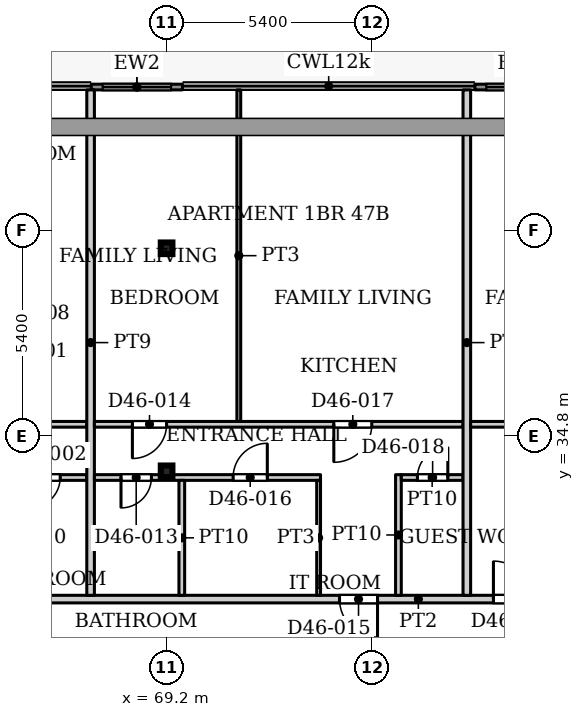
"""IFC4 building model, lengths in metres.
Left out: names, types, materials, properties, quantities, classifications, styles, units other than length and angle.
Written with IfcOpenShell. Run it as: python <this file> out.ifc"""

import sys

from ifc_helpers import new_model, si_unit, direction, frame, frame_2d, origin, origin_2d, place, context, subcontext, project, spatial, rectangle, hollow_rectangle, extrude, source, transform, mapped, element, fill, save


model = new_model("IFC4")
c1 = context("Model", 3, precision=1e-05, world=origin(), true_north=direction((0.0, 1.0)))
c2 = subcontext(c1, "Body", "Model", "MODEL_VIEW")
j1 = project(units=[si_unit("LENGTHUNIT", "METRE"), si_unit("PLANEANGLEUNIT", "RADIAN")], contexts=[c1])
p1 = place(None, origin())
s1 = spatial("IfcSite", under=j1, at=p1, CompositionType="ELEMENT")
p2 = place(p1, origin())
s2 = spatial("IfcBuilding", under=s1, at=p2, CompositionType="ELEMENT")
p3 = place(p2, frame((0.0, 0.0, 199.4)))
s3 = spatial("IfcBuildingStorey", under=s2, at=p3, CompositionType="ELEMENT", Elevation=199.4)
for number, where, z_axis, x_axis in (
    (1, (69.2, 33.863, 0.0), (0.0, 0.0, 1.0), (1.0, 0.0, 0.0)),
    (2, (69.2, 39.732, 0.0), (0.0, 0.0, 1.0), (1.0, 0.0, 0.0)),
):
    element("IfcColumn", number, at=place(p3, frame(where, z_axis=z_axis, x_axis=x_axis)), inside=s3, PredefinedType="COLUMN", context=c2, shape_type="SweptSolid", body=[
        extrude(hollow_rectangle(XDim=0.305, YDim=0.305, WallThickness=0.016, InnerFilletRadius=0.016, OuterFilletRadius=0.032, at=origin_2d()), origin(), (0.0, 0.0, 1.0), 3.9),
    ])
p4 = place(p3, frame((67.218, 43.975, 0.0), z_axis=(0.0, 0.0, 1.0), x_axis=(1.0, 0.0, 0.0)))
e3 = element("IfcWall", 3, at=p4, inside=s3, PredefinedType="SOLIDWALL", context=c2, shape_type="SweptSolid", body=[
    extrude(rectangle(XDim=2.4, YDim=0.15, at=frame_2d((1.2, 0.0))), origin(), (0.0, 0.0, 1.0), 3.75),
])
p5 = place(p4, frame((0.3, 0.0, 0.0)))
e4 = element("IfcOpeningElement", 4, at=p5, cuts=e3, PredefinedType="OPENING", context=c2, shape_type="SweptSolid", body=[
    extrude(rectangle(XDim=1.8, YDim=2.4, at=frame_2d((0.9, 1.2))), frame((0.0, 0.085, 0.0), z_axis=(0.0, -1.0, 0.0), x_axis=(1.0, 0.0, 0.0)), (0.0, 0.0, 1.0), 0.17),
])
p6 = place(p3, frame((77.312, 43.975, 0.0), z_axis=(0.0, 0.0, 1.0), x_axis=(1.0, 0.0, 0.0)))
e5 = element("IfcWall", 5, at=p6, inside=s3, PredefinedType="SOLIDWALL", context=c2, shape_type="SweptSolid", body=[
    extrude(rectangle(XDim=2.4, YDim=0.15, at=frame_2d((1.2, 0.0))), origin(), (0.0, 0.0, 1.0), 3.75),
])
p7 = place(p6, frame((0.3, 0.0, 0.0)))
e6 = element("IfcOpeningElement", 6, at=p7, cuts=e5, PredefinedType="OPENING", context=c2, shape_type="SweptSolid", body=[
    extrude(rectangle(XDim=1.8, YDim=2.4, at=frame_2d((0.9, 1.2))), frame((0.0, 0.085, 0.0), z_axis=(0.0, -1.0, 0.0), x_axis=(1.0, 0.0, 0.0)), (0.0, 0.0, 1.0), 0.17),
])
p8 = place(p3, frame((53.549, 30.5, 0.0), z_axis=(0.0, 0.0, 1.0), x_axis=(1.0, 0.0, 0.0)))
e7 = element("IfcWall", 7, at=p8, inside=s3, PredefinedType="PARTITIONING", context=c2, shape_type="SweptSolid", body=[
    extrude(rectangle(XDim=44.551, YDim=0.2, at=frame_2d((22.275, 0.0))), origin(), (0.0, 0.0, 1.0), 3.6),
])
p9 = place(p8, frame((5.501, 0.0, 0.0)))
e8 = element("IfcOpeningElement", 8, at=p9, cuts=e7, PredefinedType="OPENING", context=c2, shape_type="SweptSolid", body=[
    extrude(rectangle(XDim=1.0, YDim=2.1, at=frame_2d((0.5, 1.05))), frame((0.0, 0.11, 0.0), z_axis=(0.0, -1.0, 0.0), x_axis=(1.0, 0.0, 0.0)), (0.0, 0.0, 1.0), 0.22),
])
p10 = place(p8, frame((20.201, 0.0, 0.0)))
e9 = element("IfcOpeningElement", 9, at=p10, cuts=e7, PredefinedType="OPENING", context=c2, shape_type="SweptSolid", body=[
    extrude(rectangle(XDim=1.0, YDim=2.1, at=frame_2d((0.5, 1.05))), frame((0.0, 0.11, 0.0), z_axis=(0.0, -1.0, 0.0), x_axis=(1.0, 0.0, 0.0)), (0.0, 0.0, 1.0), 0.22),
])
p11 = place(p8, frame((24.251, 0.0, 0.0)))
e10 = element("IfcOpeningElement", 10, at=p11, cuts=e7, PredefinedType="OPENING", context=c2, shape_type="SweptSolid", body=[
    extrude(rectangle(XDim=1.0, YDim=2.1, at=frame_2d((0.5, 1.05))), frame((0.0, 0.11, 0.0), z_axis=(0.0, -1.0, 0.0), x_axis=(1.0, 0.0, 0.0)), (0.0, 0.0, 1.0), 0.22),
])
p12 = place(p8, frame((40.151, 0.0, 0.0)))
e11 = element("IfcOpeningElement", 11, at=p12, cuts=e7, PredefinedType="OPENING", context=c2, shape_type="SweptSolid", body=[
    extrude(rectangle(XDim=1.0, YDim=2.1, at=frame_2d((0.5, 1.05))), frame((0.0, 0.11, 0.0), z_axis=(0.0, -1.0, 0.0), x_axis=(1.0, 0.0, 0.0)), (0.0, 0.0, 1.0), 0.22),
])
p13 = place(p3, frame((53.549, 35.1, 0.0), z_axis=(0.0, 0.0, 1.0), x_axis=(1.0, 0.0, 0.0)))
e12 = element("IfcWall", 12, at=p13, inside=s3, PredefinedType="PARTITIONING", context=c2, shape_type="SweptSolid", body=[
    extrude(rectangle(XDim=13.551, YDim=0.15, at=frame_2d((6.775, 0.0))), origin(), (0.0, 0.0, 1.0), 3.6),
])
p14 = place(p13, frame((3.901, 0.0, 0.0)))
e13 = element("IfcOpeningElement", 13, at=p14, cuts=e12, PredefinedType="OPENING", context=c2, shape_type="SweptSolid", body=[
    extrude(rectangle(XDim=0.9, YDim=2.1, at=frame_2d((0.45, 1.05))), frame((0.0, 0.085, 0.0), z_axis=(0.0, -1.0, 0.0), x_axis=(1.0, 0.0, 0.0)), (0.0, 0.0, 1.0), 0.17),
])
p15 = place(p13, frame((8.701, 0.0, 0.0)))
e14 = element("IfcOpeningElement", 14, at=p15, cuts=e12, PredefinedType="OPENING", context=c2, shape_type="SweptSolid", body=[
    extrude(rectangle(XDim=0.9, YDim=2.1, at=frame_2d((0.45, 1.05))), frame((0.0, 0.085, 0.0), z_axis=(0.0, -1.0, 0.0), x_axis=(1.0, 0.0, 0.0)), (0.0, 0.0, 1.0), 0.17),
])
p16 = place(p13, frame((11.501, 0.0, 0.0)))
e15 = element("IfcOpeningElement", 15, at=p16, cuts=e12, PredefinedType="OPENING", context=c2, shape_type="SweptSolid", body=[
    extrude(rectangle(XDim=1.0, YDim=2.1, at=frame_2d((0.5, 1.05))), frame((0.0, 0.085, 0.0), z_axis=(0.0, -1.0, 0.0), x_axis=(1.0, 0.0, 0.0)), (0.0, 0.0, 1.0), 0.17),
])
p17 = place(p13, frame((6.301, 0.0, 0.0)))
e16 = element("IfcOpeningElement", 16, at=p17, cuts=e12, PredefinedType="OPENING", context=c2, shape_type="SweptSolid", body=[
    extrude(rectangle(XDim=0.9, YDim=2.1, at=frame_2d((0.45, 1.05))), frame((0.0, 0.085, 0.0), z_axis=(0.0, -1.0, 0.0), x_axis=(1.0, 0.0, 0.0)), (0.0, 0.0, 1.0), 0.17),
])
p18 = place(p13, frame((0.15, 0.0, 0.0)))
e17 = element("IfcOpeningElement", 17, at=p18, cuts=e12, PredefinedType="OPENING", context=c2, shape_type="SweptSolid", body=[
    extrude(rectangle(XDim=0.7, YDim=2.1, at=frame_2d((0.35, 1.05))), frame((0.0, 0.085, 0.0), z_axis=(0.0, -1.0, 0.0), x_axis=(1.0, 0.0, 0.0)), (0.0, 0.0, 1.0), 0.17),
])
p19 = place(p3, frame((60.525, 33.7, 0.0), z_axis=(0.0, 0.0, 1.0), x_axis=(1.0, 0.0, 0.0)))
e18 = element("IfcWall", 18, at=p19, inside=s3, PredefinedType="PARTITIONING", context=c2, shape_type="SweptSolid", body=[
    extrude(rectangle(XDim=6.575, YDim=0.15, at=frame_2d((3.288, 0.0))), origin(), (0.0, 0.0, 1.0), 3.6),
])
p20 = place(p19, frame((2.675, 0.0, 0.0)))
e19 = element("IfcOpeningElement", 19, at=p20, cuts=e18, PredefinedType="OPENING", context=c2, shape_type="SweptSolid", body=[
    extrude(rectangle(XDim=0.8, YDim=2.1, at=frame_2d((0.4, 1.05))), frame((0.0, 0.085, 0.0), z_axis=(0.0, -1.0, 0.0), x_axis=(1.0, 0.0, 0.0)), (0.0, 0.0, 1.0), 0.17),
])
p21 = place(p19, frame((5.075, 0.0, 0.0)))
e20 = element("IfcOpeningElement", 20, at=p21, cuts=e18, PredefinedType="OPENING", context=c2, shape_type="SweptSolid", body=[
    extrude(rectangle(XDim=0.8, YDim=2.1, at=frame_2d((0.4, 1.05))), frame((0.0, 0.085, 0.0), z_axis=(0.0, -1.0, 0.0), x_axis=(1.0, 0.0, 0.0)), (0.0, 0.0, 1.0), 0.17),
])
p22 = place(p19, frame((0.575, 0.0, 0.0)))
e21 = element("IfcOpeningElement", 21, at=p22, cuts=e18, PredefinedType="OPENING", context=c2, shape_type="SweptSolid", body=[
    extrude(rectangle(XDim=0.8, YDim=2.1, at=frame_2d((0.4, 1.05))), frame((0.0, 0.085, 0.0), z_axis=(0.0, -1.0, 0.0), x_axis=(1.0, 0.0, 0.0)), (0.0, 0.0, 1.0), 0.17),
])
p23 = place(p3, frame((67.2, 30.6, 0.0), z_axis=(0.0, 0.0, 1.0), x_axis=(0.0, 1.0, 0.0)))
e22 = element("IfcWall", 22, at=p23, inside=s3, PredefinedType="PARTITIONING", context=c2, shape_type="SweptSolid", body=[
    extrude(rectangle(XDim=13.3, YDim=0.2, at=frame_2d((6.65, 0.0))), origin(), (0.0, 0.0, 1.0), 3.6),
])
p24 = place(p3, frame((67.3, 33.7, 0.0), z_axis=(0.0, 0.0, 1.0), x_axis=(1.0, 0.0, 0.0)))
e23 = element("IfcWall", 23, at=p24, inside=s3, PredefinedType="PARTITIONING", context=c2, shape_type="SweptSolid", body=[
    extrude(rectangle(XDim=5.95, YDim=0.15, at=frame_2d((2.975, 0.0))), origin(), (0.0, 0.0, 1.0), 3.6),
])
p25 = place(p24, frame((0.7, 0.0, 0.0)))
e24 = element("IfcOpeningElement", 24, at=p25, cuts=e23, PredefinedType="OPENING", context=c2, shape_type="SweptSolid", body=[
    extrude(rectangle(XDim=0.8, YDim=2.1, at=frame_2d((0.4, 1.05))), frame((0.0, 0.085, 0.0), z_axis=(0.0, -1.0, 0.0), x_axis=(1.0, 0.0, 0.0)), (0.0, 0.0, 1.0), 0.17),
])
p26 = place(p24, frame((3.65, 0.0, 0.0)))
e25 = element("IfcOpeningElement", 25, at=p26, cuts=e23, PredefinedType="OPENING", context=c2, shape_type="SweptSolid", body=[
    extrude(rectangle(XDim=0.9, YDim=2.1, at=frame_2d((0.45, 1.05))), frame((0.0, 0.085, 0.0), z_axis=(0.0, -1.0, 0.0), x_axis=(1.0, 0.0, 0.0)), (0.0, 0.0, 1.0), 0.17),
])
p27 = place(p3, frame((67.3, 35.1, 0.0), z_axis=(0.0, 0.0, 1.0), x_axis=(1.0, 0.0, 0.0)))
e26 = element("IfcWall", 26, at=p27, inside=s3, PredefinedType="PARTITIONING", context=c2, shape_type="SweptSolid", body=[
    extrude(rectangle(XDim=9.7, YDim=0.15, at=frame_2d((4.85, 0.0))), origin(), (0.0, 0.0, 1.0), 3.6),
])
p28 = place(p27, frame((1.0, 0.0, 0.0)))
e27 = element("IfcOpeningElement", 27, at=p28, cuts=e26, PredefinedType="OPENING", context=c2, shape_type="SweptSolid", body=[
    extrude(rectangle(XDim=0.9, YDim=2.1, at=frame_2d((0.45, 1.05))), frame((0.0, 0.085, 0.0), z_axis=(0.0, -1.0, 0.0), x_axis=(1.0, 0.0, 0.0)), (0.0, 0.0, 1.0), 0.17),
])
p29 = place(p27, frame((6.3, 0.0, 0.0)))
e28 = element("IfcOpeningElement", 28, at=p29, cuts=e26, PredefinedType="OPENING", context=c2, shape_type="SweptSolid", body=[
    extrude(rectangle(XDim=1.0, YDim=2.1, at=frame_2d((0.5, 1.05))), frame((0.0, 0.085, 0.0), z_axis=(0.0, -1.0, 0.0), x_axis=(1.0, 0.0, 0.0)), (0.0, 0.0, 1.0), 0.17),
])
p30 = place(p3, frame((69.6, 30.6, 0.0), z_axis=(0.0, 0.0, 1.0), x_axis=(0.0, 1.0, 0.0)))
e29 = element("IfcWall", 29, at=p30, inside=s3, PredefinedType="PARTITIONING", context=c2, shape_type="SweptSolid", body=[
    extrude(rectangle(XDim=3.025, YDim=0.15, at=frame_2d((1.512, 0.0))), origin(), (0.0, 0.0, 1.0), 3.6),
])
p31 = place(p3, frame((71.1, 35.175, 0.0), z_axis=(0.0, 0.0, 1.0), x_axis=(0.0, 1.0, 0.0)))
e30 = element("IfcWall", 30, at=p31, inside=s3, PredefinedType="PARTITIONING", context=c2, shape_type="SweptSolid", body=[
    extrude(rectangle(XDim=8.725, YDim=0.1, at=frame_2d((4.362, 0.0))), origin(), (0.0, 0.0, 1.0), 3.6),
])
p32 = place(p3, frame((73.2, 30.6, 0.0), z_axis=(0.0, 0.0, 1.0), x_axis=(0.0, 1.0, 0.0)))
e31 = element("IfcWall", 31, at=p32, inside=s3, PredefinedType="PARTITIONING", context=c2, shape_type="SweptSolid", body=[
    extrude(rectangle(XDim=3.025, YDim=0.1, at=frame_2d((1.512, 0.0))), origin(), (0.0, 0.0, 1.0), 3.6),
])
p33 = place(p3, frame((75.3, 30.6, 0.0), z_axis=(0.0, 0.0, 1.0), x_axis=(0.0, 1.0, 0.0)))
e32 = element("IfcWall", 32, at=p33, inside=s3, PredefinedType="PARTITIONING", context=c2, shape_type="SweptSolid", body=[
    extrude(rectangle(XDim=3.175, YDim=0.15, at=frame_2d((1.587, 0.0))), origin(), (0.0, 0.0, 1.0), 3.6),
])
p34 = place(p3, frame((75.375, 33.7, 0.0), z_axis=(0.0, 0.0, 1.0), x_axis=(1.0, 0.0, 0.0)))
e33 = element("IfcWall", 33, at=p34, inside=s3, PredefinedType="PARTITIONING", context=c2, shape_type="SweptSolid", body=[
    extrude(rectangle(XDim=1.625, YDim=0.15, at=frame_2d((0.812, 0.0))), origin(), (0.0, 0.0, 1.0), 3.6),
])
p35 = place(p34, frame((0.425, 0.0, 0.0)))
e34 = element("IfcOpeningElement", 34, at=p35, cuts=e33, PredefinedType="OPENING", context=c2, shape_type="SweptSolid", body=[
    extrude(rectangle(XDim=0.8, YDim=2.1, at=frame_2d((0.4, 1.05))), frame((0.0, 0.085, 0.0), z_axis=(0.0, -1.0, 0.0), x_axis=(1.0, 0.0, 0.0)), (0.0, 0.0, 1.0), 0.17),
])
p36 = place(p3, frame((77.1, 30.6, 0.0), z_axis=(0.0, 0.0, 1.0), x_axis=(0.0, 1.0, 0.0)))
e35 = element("IfcWall", 35, at=p36, inside=s3, PredefinedType="PARTITIONING", context=c2, shape_type="SweptSolid", body=[
    extrude(rectangle(XDim=13.3, YDim=0.2, at=frame_2d((6.65, 0.0))), origin(), (0.0, 0.0, 1.0), 3.6),
])
p37 = place(p3, frame((77.2, 35.1, 0.0), z_axis=(0.0, 0.0, 1.0), x_axis=(1.0, 0.0, 0.0)))
e36 = element("IfcWall", 36, at=p37, inside=s3, PredefinedType="PARTITIONING", context=c2, shape_type="SweptSolid", body=[
    extrude(rectangle(XDim=11.8, YDim=0.15, at=frame_2d((5.9, 0.0))), origin(), (0.0, 0.0, 1.0), 3.6),
])
p38 = place(p37, frame((6.2, 0.0, 0.0)))
e37 = element("IfcOpeningElement", 37, at=p38, cuts=e36, PredefinedType="OPENING", context=c2, shape_type="SweptSolid", body=[
    extrude(rectangle(XDim=0.9, YDim=2.1, at=frame_2d((0.45, 1.05))), frame((0.0, 0.085, 0.0), z_axis=(0.0, -1.0, 0.0), x_axis=(1.0, 0.0, 0.0)), (0.0, 0.0, 1.0), 0.17),
])
p39 = place(p37, frame((1.95, 0.0, 0.0)))
e38 = element("IfcOpeningElement", 38, at=p39, cuts=e36, PredefinedType="OPENING", context=c2, shape_type="SweptSolid", body=[
    extrude(rectangle(XDim=1.0, YDim=2.1, at=frame_2d((0.5, 1.05))), frame((0.0, 0.085, 0.0), z_axis=(0.0, -1.0, 0.0), x_axis=(1.0, 0.0, 0.0)), (0.0, 0.0, 1.0), 0.17),
])
p40 = place(p37, frame((10.7, 0.0, 0.0)))
e39 = element("IfcOpeningElement", 39, at=p40, cuts=e36, PredefinedType="OPENING", context=c2, shape_type="SweptSolid", body=[
    extrude(rectangle(XDim=0.9, YDim=2.1, at=frame_2d((0.45, 1.05))), frame((0.0, 0.085, 0.0), z_axis=(0.0, -1.0, 0.0), x_axis=(1.0, 0.0, 0.0)), (0.0, 0.0, 1.0), 0.17),
])
m1 = source(origin(), c2, "Body", "SweptSolid", [
    extrude(rectangle(XDim=1.8, YDim=2.4, at=frame_2d((0.9, 1.2))), frame((0.0, 0.025, 0.0), z_axis=(0.0, -1.0, 0.0), x_axis=(1.0, 0.0, 0.0)), (0.0, 0.0, 1.0), 0.05),
])
p41 = place(p5, origin())
e40 = element("IfcDoor", 40, at=p41, inside=s3, OperationType="SLIDING_TO_LEFT", PredefinedType="DOOR", context=c2, shape_type="MappedRepresentation", body=[
    mapped(m1, transform((0.0, 0.0, 0.0), x_axis=(1.0, 0.0, 0.0), y_axis=(0.0, 1.0, 0.0), z_axis=(0.0, 0.0, 1.0), scale=1.0)),
])
fill(e4, e40)
p42 = place(p7, origin())
e41 = element("IfcDoor", 41, at=p42, inside=s3, OperationType="SLIDING_TO_LEFT", PredefinedType="DOOR", context=c2, shape_type="MappedRepresentation", body=[
    mapped(m1, transform((0.0, 0.0, 0.0), x_axis=(1.0, 0.0, 0.0), y_axis=(0.0, 1.0, 0.0), z_axis=(0.0, 0.0, 1.0), scale=1.0)),
])
fill(e6, e41)
m2 = source(origin(), c2, "Body", "SweptSolid", [
    extrude(rectangle(XDim=0.8, YDim=2.1, at=frame_2d((0.4, 1.05))), frame((0.0, 0.025, 0.0), z_axis=(0.0, -1.0, 0.0), x_axis=(1.0, 0.0, 0.0)), (0.0, 0.0, 1.0), 0.05),
])
p43 = place(p21, origin())
e42 = element("IfcDoor", 42, at=p43, inside=s3, OperationType="SINGLE_SWING_RIGHT", PredefinedType="DOOR", context=c2, shape_type="MappedRepresentation", body=[
    mapped(m2, transform((0.0, 0.0, 0.0), x_axis=(1.0, 0.0, 0.0), y_axis=(0.0, 1.0, 0.0), z_axis=(0.0, 0.0, 1.0), scale=1.0)),
])
fill(e20, e42)
p44 = place(p25, origin())
e43 = element("IfcDoor", 43, at=p44, inside=s3, OperationType="SINGLE_SWING_RIGHT", PredefinedType="DOOR", context=c2, shape_type="MappedRepresentation", body=[
    mapped(m2, transform((0.0, 0.0, 0.0), x_axis=(1.0, 0.0, 0.0), y_axis=(0.0, 1.0, 0.0), z_axis=(0.0, 0.0, 1.0), scale=1.0)),
])
fill(e24, e43)
m3 = source(origin(), c2, "Body", "SweptSolid", [
    extrude(rectangle(XDim=0.9, YDim=2.1, at=frame_2d((0.45, 1.05))), frame((0.0, 0.025, 0.0), z_axis=(0.0, -1.0, 0.0), x_axis=(1.0, 0.0, 0.0)), (0.0, 0.0, 1.0), 0.05),
])
p45 = place(p28, origin())
e44 = element("IfcDoor", 44, at=p45, inside=s3, OperationType="SINGLE_SWING_RIGHT", PredefinedType="DOOR", context=c2, shape_type="MappedRepresentation", body=[
    mapped(m3, transform((0.0, 0.0, 0.0), x_axis=(1.0, 0.0, 0.0), y_axis=(0.0, 1.0, 0.0), z_axis=(0.0, 0.0, 1.0), scale=1.0)),
])
fill(e27, e44)
m4 = source(origin(), c2, "Body", "SweptSolid", [
    extrude(rectangle(XDim=1.0, YDim=2.1, at=frame_2d((0.5, 1.05))), frame((0.0, 0.025, 0.0), z_axis=(0.0, -1.0, 0.0), x_axis=(1.0, 0.0, 0.0)), (0.0, 0.0, 1.0), 0.05),
])
p46 = place(p10, origin())
e45 = element("IfcDoor", 45, at=p46, inside=s3, OperationType="SINGLE_SWING_RIGHT", PredefinedType="DOOR", context=c2, shape_type="MappedRepresentation", body=[
    mapped(m4, transform((0.0, 0.0, 0.0), x_axis=(1.0, 0.0, 0.0), y_axis=(0.0, 1.0, 0.0), z_axis=(0.0, 0.0, 1.0), scale=1.0)),
])
fill(e9, e45)
p47 = place(p26, origin())
e46 = element("IfcDoor", 46, at=p47, inside=s3, OperationType="SINGLE_SWING_LEFT", PredefinedType="DOOR", context=c2, shape_type="MappedRepresentation", body=[
    mapped(m3, transform((0.0, 0.0, 0.0), x_axis=(1.0, 0.0, 0.0), y_axis=(0.0, 1.0, 0.0), z_axis=(0.0, 0.0, 1.0), scale=1.0)),
])
fill(e25, e46)
m5 = source(origin(), c2, "Body", "SweptSolid", [
    extrude(rectangle(XDim=1.0, YDim=2.1, at=frame_2d((0.5, 1.05))), frame((0.0, 0.025, 0.0), z_axis=(0.0, -1.0, 0.0), x_axis=(1.0, 0.0, 0.0)), (0.0, 0.0, 1.0), 0.05),
])
p48 = place(p29, origin())
e47 = element("IfcDoor", 47, at=p48, inside=s3, OperationType="SINGLE_SWING_RIGHT", PredefinedType="DOOR", context=c2, shape_type="MappedRepresentation", body=[
    mapped(m5, transform((0.0, 0.0, 0.0), x_axis=(1.0, 0.0, 0.0), y_axis=(0.0, 1.0, 0.0), z_axis=(0.0, 0.0, 1.0), scale=1.0)),
])
fill(e28, e47)
p49 = place(p35, origin())
e48 = element("IfcDoor", 48, at=p49, inside=s3, OperationType="SINGLE_SWING_LEFT", PredefinedType="DOOR", context=c2, shape_type="MappedRepresentation", body=[
    mapped(m2, transform((0.0, 0.0, 0.0), x_axis=(1.0, 0.0, 0.0), y_axis=(0.0, 1.0, 0.0), z_axis=(0.0, 0.0, 1.0), scale=1.0)),
])
fill(e34, e48)
p50 = place(p11, origin())
e49 = element("IfcDoor", 49, at=p50, inside=s3, OperationType="SINGLE_SWING_LEFT", PredefinedType="DOOR", context=c2, shape_type="MappedRepresentation", body=[
    mapped(m4, transform((0.0, 0.0, 0.0), x_axis=(1.0, 0.0, 0.0), y_axis=(0.0, 1.0, 0.0), z_axis=(0.0, 0.0, 1.0), scale=1.0)),
])
fill(e10, e49)
save(model, sys.argv[1])
